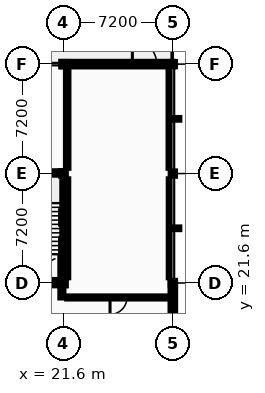
"""IFC4 building model, lengths in metres.
Left out: names, types, materials, properties, quantities, classifications, styles, units other than length and angle.
Written with IfcOpenShell. Run it as: python <this file> out.ifc"""

import sys

from ifc_helpers import new_model, si_unit, direction, frame, frame_2d, origin, origin_2d, place, context, subcontext, project, spatial, rectangle, i_section, extrude, element, fill, save


model = new_model("IFC4")
c1 = context("Model", 3, precision=1e-05, world=origin(), true_north=direction((0.0, 1.0)))
c2 = subcontext(c1, "Body", "Model", "MODEL_VIEW")
j1 = project(units=[si_unit("LENGTHUNIT", "METRE"), si_unit("PLANEANGLEUNIT", "RADIAN")], contexts=[c1])
p1 = place(None, origin())
s1 = spatial("IfcSite", under=j1, at=p1, CompositionType="ELEMENT")
p2 = place(p1, origin())
s2 = spatial("IfcBuilding", under=s1, at=p2, CompositionType="ELEMENT")
p3 = place(p2, frame((0.0, 0.0, 27.2)))
s3 = spatial("IfcBuildingStorey", under=s2, at=p3, CompositionType="ELEMENT", Elevation=27.2)
for number, where, z_axis, x_axis in (
    (1, (21.6, 21.6, 0.0), (0.0, 0.0, 1.0), (1.0, 0.0, 0.0)),
    (2, (21.6, 28.8, 0.0), (0.0, 0.0, 1.0), (1.0, 0.0, 0.0)),
    (3, (21.6, 36.0, 0.0), (0.0, 0.0, 1.0), (1.0, 0.0, 0.0)),
    (4, (28.8, 21.6, 0.0), (0.0, 0.0, 1.0), (1.0, 0.0, 0.0)),
    (5, (28.8, 28.8, 0.0), (0.0, 0.0, 1.0), (1.0, 0.0, 0.0)),
    (6, (28.8, 36.0, 0.0), (0.0, 0.0, 1.0), (1.0, 0.0, 0.0)),
):
    element("IfcColumn", number, at=place(p3, frame(where, z_axis=z_axis, x_axis=x_axis)), inside=s3, PredefinedType="COLUMN", context=c2, shape_type="SweptSolid", body=[
        extrude(i_section(OverallWidth=0.28, OverallDepth=0.28, WebThickness=0.01, FlangeThickness=0.018, FilletRadius=0.024, at=origin_2d()), origin(), (0.0, 0.0, 1.0), 4.4),
    ])
p4 = place(p3, frame((28.8, 36.0, 0.0), z_axis=(0.0, 0.0, 1.0), x_axis=(-1.0, 0.0, 0.0)))
e7 = element("IfcWall", 7, at=p4, inside=s3, PredefinedType="STANDARD", context=c2, shape_type="SweptSolid", body=[
    extrude(rectangle(XDim=7.31, YDim=0.3, at=frame_2d((3.655, 0.0))), origin(), (0.0, 0.0, 1.0), 4.035),
])
p5 = place(p4, frame((1.062, 0.0, 0.0)))
e8 = element("IfcOpeningElement", 8, at=p5, cuts=e7, PredefinedType="OPENING", context=c2, shape_type="SweptSolid", body=[
    extrude(rectangle(XDim=1.6, YDim=2.2, at=frame_2d((0.8, 1.1))), frame((0.0, 0.16, 0.0), z_axis=(0.0, -1.0, 0.0), x_axis=(1.0, 0.0, 0.0)), (0.0, 0.0, 1.0), 0.32),
])
p6 = place(p3, frame((28.8, 14.45, 0.0), z_axis=(0.0, 0.0, 1.0), x_axis=(0.0, 1.0, 0.0)))
e9 = element("IfcWall", 9, at=p6, inside=s3, PredefinedType="STANDARD", context=c2, shape_type="SweptSolid", body=[
    extrude(rectangle(XDim=7.15, YDim=0.3, at=frame_2d((3.575, 0.0))), origin(), (0.0, 0.0, 1.0), 4.18),
])
p7 = place(p6, frame((1.528, 0.0, 0.95)))
e10 = element("IfcOpeningElement", 10, at=p7, cuts=e9, PredefinedType="OPENING", context=c2, shape_type="SweptSolid", body=[
    extrude(rectangle(XDim=1.234, YDim=1.26, at=frame_2d((0.617, 0.63))), frame((0.0, 0.16, 0.0), z_axis=(0.0, -1.0, 0.0), x_axis=(1.0, 0.0, 0.0)), (0.0, 0.0, 1.0), 0.32),
])
p8 = place(p6, frame((4.388, 0.0, 0.95)))
e11 = element("IfcOpeningElement", 11, at=p8, cuts=e9, PredefinedType="OPENING", context=c2, shape_type="SweptSolid", body=[
    extrude(rectangle(XDim=1.234, YDim=1.26, at=frame_2d((0.617, 0.63))), frame((0.0, 0.16, 0.0), z_axis=(0.0, -1.0, 0.0), x_axis=(1.0, 0.0, 0.0)), (0.0, 0.0, 1.0), 0.32),
])
p9 = place(p3, frame((18.25, 21.625, 0.0), z_axis=(0.0, 0.0, 1.0), x_axis=(1.0, 0.0, 0.0)))
e12 = element("IfcWall", 12, at=p9, inside=s3, PredefinedType="SHEAR", context=c2, shape_type="SweptSolid", body=[
    extrude(rectangle(XDim=3.15, YDim=0.35, at=frame_2d((1.575, 0.0))), origin(), (0.0, 0.0, 1.0), 4.2),
])
p10 = place(p9, frame((1.025, 0.0, 0.0)))
e13 = element("IfcOpeningElement", 13, at=p10, cuts=e12, PredefinedType="OPENING", context=c2, shape_type="SweptSolid", body=[
    extrude(rectangle(XDim=1.1, YDim=2.15, at=frame_2d((0.55, 1.075))), frame((0.0, 0.185, 0.0), z_axis=(0.0, -1.0, 0.0), x_axis=(1.0, 0.0, 0.0)), (0.0, 0.0, 1.0), 0.37),
])
p11 = place(p3, frame((18.25, 28.775, 0.0), z_axis=(0.0, 0.0, 1.0), x_axis=(1.0, 0.0, 0.0)))
e14 = element("IfcWall", 14, at=p11, inside=s3, PredefinedType="SHEAR", context=c2, shape_type="SweptSolid", body=[
    extrude(rectangle(XDim=3.15, YDim=0.35, at=frame_2d((1.575, 0.0))), origin(), (0.0, 0.0, 1.0), 4.2),
])
p12 = place(p3, frame((21.575, 21.45, 0.0), z_axis=(0.0, 0.0, 1.0), x_axis=(0.0, 1.0, 0.0)))
e15 = element("IfcWall", 15, at=p12, inside=s3, PredefinedType="SHEAR", context=c2, shape_type="SweptSolid", body=[
    extrude(rectangle(XDim=7.5, YDim=0.35, at=frame_2d((3.75, 0.0))), origin(), (0.0, 0.0, 1.0), 4.2),
])
p13 = place(p3, frame((21.5, 20.65, 0.0), z_axis=(0.0, 0.0, 1.0), x_axis=(0.0, 1.0, 0.0)))
e16 = element("IfcWall", 16, at=p13, inside=s3, PredefinedType="PARTITIONING", context=c2, shape_type="SweptSolid", body=[
    extrude(rectangle(XDim=0.8, YDim=0.2, at=frame_2d((0.4, 0.0))), origin(), (0.0, 0.0, 1.0), 3.85),
])
p14 = place(p3, frame((21.85, 20.65, 0.0), z_axis=(0.0, 0.0, 1.0), x_axis=(1.0, 0.0, 0.0)))
e17 = element("IfcWall", 17, at=p14, inside=s3, PredefinedType="PARTITIONING", context=c2, shape_type="SweptSolid", body=[
    extrude(rectangle(XDim=6.75, YDim=0.135, at=frame_2d((3.375, 0.0))), origin(), (0.0, 0.0, 1.0), 4.18),
])
p15 = place(p14, frame((2.818, 0.0, 0.0)))
e18 = element("IfcOpeningElement", 18, at=p15, cuts=e17, PredefinedType="OPENING", context=c2, shape_type="SweptSolid", body=[
    extrude(rectangle(XDim=1.114, YDim=2.096, at=frame_2d((0.557, 1.048))), frame((0.0, 0.078, 0.0), z_axis=(0.0, -1.0, 0.0), x_axis=(1.0, 0.0, 0.0)), (0.0, 0.0, 1.0), 0.155),
])
p16 = place(p3, frame((21.85, 21.98, 0.0), z_axis=(0.0, 0.0, 1.0), x_axis=(0.0, 1.0, 0.0)))
e19 = element("IfcWall", 19, at=p16, inside=s3, PredefinedType="PARTITIONING", context=c2, shape_type="SweptSolid", body=[
    extrude(rectangle(XDim=6.44, YDim=0.135, at=frame_2d((3.22, 0.0))), origin(), (0.0, 0.0, 1.0), 4.18),
])
p17 = place(p3, frame((21.85, 29.18, 0.0), z_axis=(0.0, 0.0, 1.0), x_axis=(0.0, 1.0, 0.0)))
e20 = element("IfcWall", 20, at=p17, inside=s3, PredefinedType="PARTITIONING", context=c2, shape_type="SweptSolid", body=[
    extrude(rectangle(XDim=6.44, YDim=0.16, at=frame_2d((3.22, 0.0))), origin(), (0.0, 0.0, 1.0), 4.18),
])
p18 = place(p3, frame((28.6, 21.98, 0.0), z_axis=(0.0, 0.0, 1.0), x_axis=(0.0, 1.0, 0.0)))
e21 = element("IfcWall", 21, at=p18, inside=s3, PredefinedType="PARTITIONING", context=c2, shape_type="SweptSolid", body=[
    extrude(rectangle(XDim=6.44, YDim=0.135, at=frame_2d((3.22, 0.0))), origin(), (0.0, 0.0, 1.0), 4.11),
])
p19 = place(p3, frame((28.6, 29.18, 0.0), z_axis=(0.0, 0.0, 1.0), x_axis=(0.0, 1.0, 0.0)))
e22 = element("IfcWall", 22, at=p19, inside=s3, PredefinedType="PARTITIONING", context=c2, shape_type="SweptSolid", body=[
    extrude(rectangle(XDim=6.44, YDim=0.16, at=frame_2d((3.22, 0.0))), origin(), (0.0, 0.0, 1.0), 4.11),
])
p20 = place(p8, origin())
e23 = element("IfcWindow", 23, at=p20, inside=s3, PartitioningType="SINGLE_PANEL", PredefinedType="WINDOW", context=c2, shape_type="SweptSolid", body=[
    extrude(rectangle(XDim=1.234, YDim=1.26, at=frame_2d((0.617, 0.63))), frame((0.0, 0.03, 0.0), z_axis=(0.0, -1.0, 0.0), x_axis=(1.0, 0.0, 0.0)), (0.0, 0.0, 1.0), 0.06),
])
fill(e11, e23)
p21 = place(p5, origin())
e24 = element("IfcDoor", 24, at=p21, inside=s3, OperationType="DOUBLE_DOOR_SINGLE_SWING", PredefinedType="DOOR", context=c2, shape_type="SweptSolid", body=[
    extrude(rectangle(XDim=1.6, YDim=2.2, at=frame_2d((0.8, 1.1))), frame((0.0, 0.025, 0.0), z_axis=(0.0, -1.0, 0.0), x_axis=(1.0, 0.0, 0.0)), (0.0, 0.0, 1.0), 0.05),
])
fill(e8, e24)
p22 = place(p15, frame((1.114, 0.0, 0.0), z_axis=(0.0, 0.0, 1.0), x_axis=(-1.0, 0.0, 0.0)))
e25 = element("IfcDoor", 25, at=p22, inside=s3, OperationType="SINGLE_SWING_LEFT", PredefinedType="DOOR", context=c2, shape_type="SweptSolid", body=[
    extrude(rectangle(XDim=1.114, YDim=2.096, at=frame_2d((0.557, 1.048))), frame((0.0, 0.025, 0.0), z_axis=(0.0, -1.0, 0.0), x_axis=(1.0, 0.0, 0.0)), (0.0, 0.0, 1.0), 0.05),
])
fill(e18, e25)
save(model, sys.argv[1])
